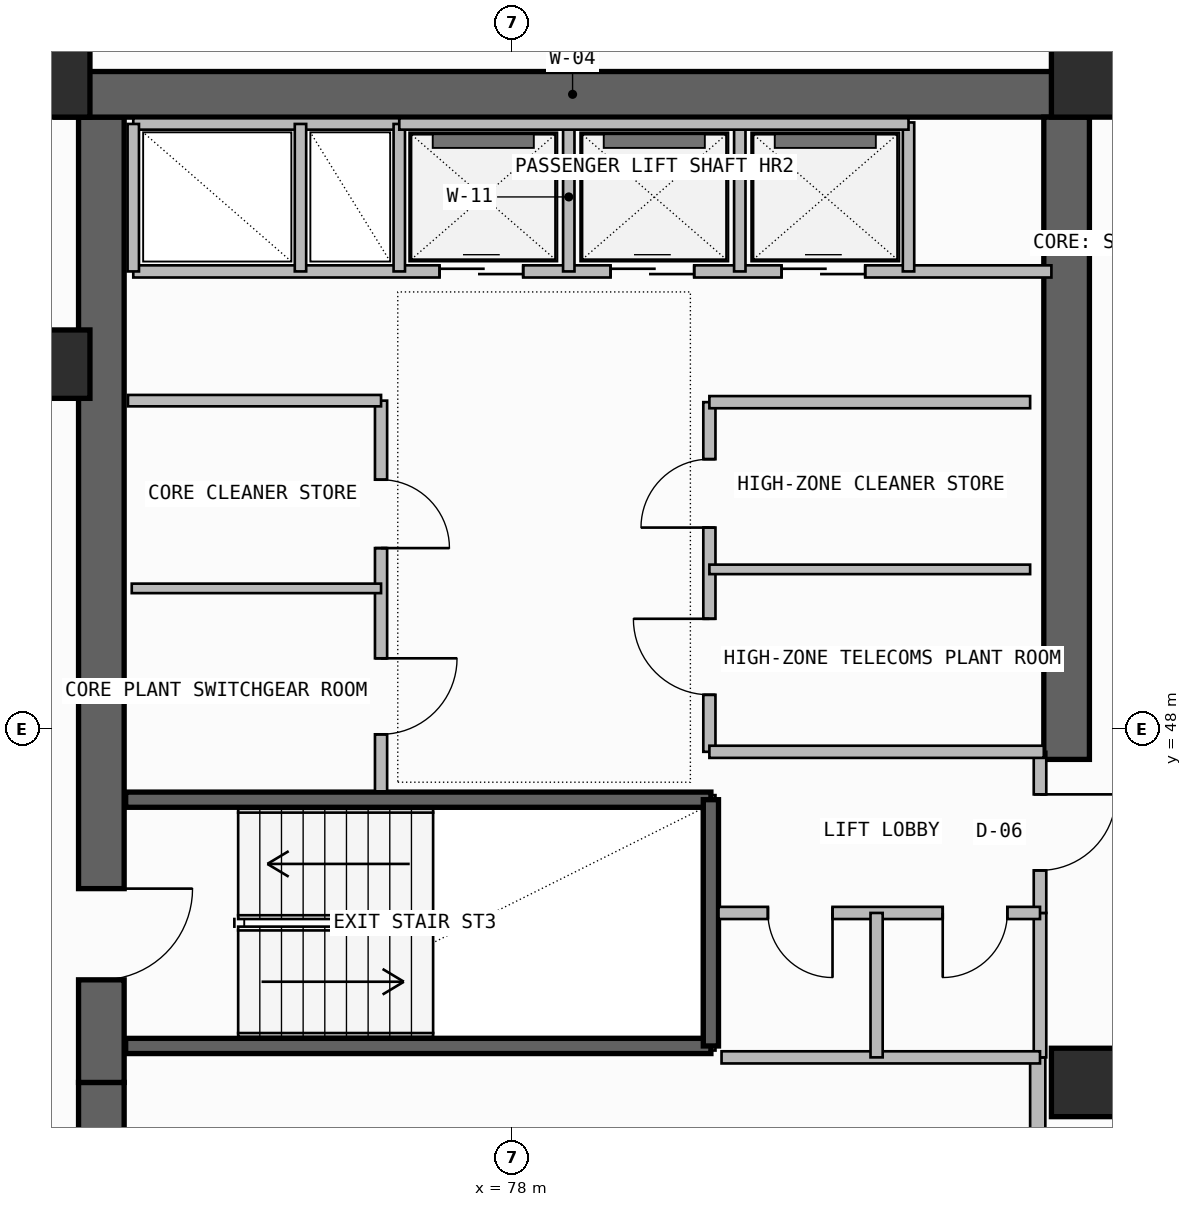
"""IFC4 building model, lengths in metres.
Left out: names, types, materials, properties, quantities, classifications, styles, units other than length and angle.
Written with IfcOpenShell. Run it as: python <this file> out.ifc"""

import sys

from ifc_helpers import new_model, si_unit, direction, frame, frame_2d, origin, origin_2d, place, context, subcontext, project, spatial, rectangle, extrude, element, fill, save


model = new_model("IFC4")
c1 = context("Model", 3, precision=1e-05, world=origin(), true_north=direction((0.0, 1.0)))
c2 = subcontext(c1, "Body", "Model", "MODEL_VIEW")
j1 = project(units=[si_unit("LENGTHUNIT", "METRE"), si_unit("PLANEANGLEUNIT", "RADIAN")], contexts=[c1])
p1 = place(None, origin())
s1 = spatial("IfcSite", under=j1, at=p1, CompositionType="ELEMENT")
p2 = place(p1, origin())
s2 = spatial("IfcBuilding", under=s1, at=p2, CompositionType="ELEMENT")
p3 = place(p2, frame((0.0, 0.0, 260.74)))
s3 = spatial("IfcBuildingStorey", under=s2, at=p3, CompositionType="ELEMENT", Elevation=260.74)
p4 = place(p3, frame((72.6, 35.5, -0.26), z_axis=(0.0, 0.0, 1.0), x_axis=(0.0, 1.0, 0.0)))
e1 = element("IfcWall", 1, at=p4, inside=s3, PredefinedType="SHEAR", context=c2, shape_type="SweptSolid", body=[
    extrude(rectangle(XDim=7.85, YDim=0.6, at=frame_2d((3.925, 0.0))), origin(), (0.0, 0.0, 1.0), 3.52),
])
p5 = place(p4, frame((1.45, 0.0, 0.26)))
e2 = element("IfcOpeningElement", 2, at=p5, cuts=e1, PredefinedType="OPENING", context=c2, shape_type="SweptSolid", body=[
    extrude(rectangle(XDim=1.2, YDim=2.2, at=frame_2d((0.6, 1.1))), frame((0.0, 0.31, 0.0), z_axis=(0.0, -1.0, 0.0), x_axis=(1.0, 0.0, 0.0)), (0.0, 0.0, 1.0), 0.62),
])
p6 = place(p3, frame((72.6, 43.35, -0.26), z_axis=(0.0, 0.0, 1.0), x_axis=(0.0, 1.0, 0.0)))
e3 = element("IfcWall", 3, at=p6, inside=s3, PredefinedType="SHEAR", context=c2, shape_type="SweptSolid", body=[
    extrude(rectangle(XDim=12.7, YDim=0.6, at=frame_2d((6.35, 0.0))), origin(), (0.0, 0.0, 1.0), 3.52),
])
p7 = place(p6, frame((1.35, 0.0, 0.26)))
e4 = element("IfcOpeningElement", 4, at=p7, cuts=e3, PredefinedType="OPENING", context=c2, shape_type="SweptSolid", body=[
    extrude(rectangle(XDim=1.2, YDim=2.2, at=frame_2d((0.6, 1.1))), frame((0.0, 0.31, 0.0), z_axis=(0.0, -1.0, 0.0), x_axis=(1.0, 0.0, 0.0)), (0.0, 0.0, 1.0), 0.62),
])
p8 = place(p3, frame((72.0, 56.35, -0.26), z_axis=(0.0, 0.0, 1.0), x_axis=(1.0, 0.0, 0.0)))
e5 = element("IfcWall", 5, at=p8, inside=s3, PredefinedType="SHEAR", context=c2, shape_type="SweptSolid", body=[
    extrude(rectangle(XDim=13.6, YDim=0.6, at=frame_2d((6.8, 0.0))), origin(), (0.0, 0.0, 1.0), 3.52),
])
p9 = place(p3, frame((85.3, 47.6, -0.26), z_axis=(0.0, 0.0, 1.0), x_axis=(0.0, 1.0, 0.0)))
e6 = element("IfcWall", 6, at=p9, inside=s3, PredefinedType="SHEAR", context=c2, shape_type="SweptSolid", body=[
    extrude(rectangle(XDim=8.45, YDim=0.6, at=frame_2d((4.225, 0.0))), origin(), (0.0, 0.0, 1.0), 3.52),
])
for number, where, z_axis, x_axis in (
    (7, (85.55, 43.35, 0.0), (0.0, 0.0, 1.0), (1.0, 0.0, 0.0)),
    (8, (72.0, 52.8, 0.0), (0.0, 0.0, 1.0), (1.0, 0.0, 0.0)),
    (9, (72.0, 56.5, 0.0), (0.0, 0.0, 1.0), (1.0, 0.0, 0.0)),
    (10, (85.55, 56.5, 0.0), (0.0, 0.0, 1.0), (1.0, 0.0, 0.0)),
):
    element("IfcColumn", number, at=place(p3, frame(where, z_axis=z_axis, x_axis=x_axis)), inside=s3, PredefinedType="COLUMN", context=c2, shape_type="SweptSolid", body=[
        extrude(rectangle(XDim=0.9, YDim=0.9, at=origin_2d()), origin(), (0.0, 0.0, 1.0), 3.52),
    ])
p10 = place(p3, frame((84.92, 38.85, 0.0), z_axis=(0.0, 0.0, 1.0), x_axis=(0.0, 1.0, 0.0)))
e11 = element("IfcWall", 11, at=p10, inside=s3, PredefinedType="SOLIDWALL", context=c2, shape_type="SweptSolid", body=[
    extrude(rectangle(XDim=4.83, YDim=0.2, at=frame_2d((2.415, 0.0))), origin(), (0.0, 0.0, 1.0), 3.26),
])
p11 = place(p10, frame((1.25, 0.0, 0.0)))
e12 = element("IfcOpeningElement", 12, at=p11, cuts=e11, PredefinedType="OPENING", context=c2, shape_type="SweptSolid", body=[
    extrude(rectangle(XDim=1.1, YDim=2.2, at=frame_2d((0.55, 1.1))), frame((0.0, 0.11, 0.0), z_axis=(0.0, -1.0, 0.0), x_axis=(1.0, 0.0, 0.0)), (0.0, 0.0, 1.0), 0.22),
])
for number, where, z_axis, x_axis in (
    (13, (72.92, 43.83, -0.26), (0.0, 0.0, 1.0), (1.0, 0.0, 0.0)),
    (14, (72.92, 47.07, -0.26), (0.0, 0.0, 1.0), (1.0, 0.0, 0.0)),
):
    element("IfcWall", number, at=place(p3, frame(where, z_axis=z_axis, x_axis=x_axis)), inside=s3, PredefinedType="SOLIDWALL", context=c2, shape_type="SweptSolid", body=[
        extrude(rectangle(XDim=7.7, YDim=0.2, at=frame_2d((3.85, 0.0))), origin(), (0.0, 0.0, 1.0), 3.52),
    ])
p12 = place(p3, frame((80.62, 43.83, -0.26), z_axis=(0.0, 0.0, 1.0), x_axis=(0.0, 1.0, 0.0)))
e15 = element("IfcWall", 15, at=p12, inside=s3, PredefinedType="SOLIDWALL", context=c2, shape_type="SweptSolid", body=[
    extrude(rectangle(XDim=3.24, YDim=0.2, at=frame_2d((1.62, 0.0))), origin(), (0.0, 0.0, 1.0), 3.52),
])
p13 = place(p3, frame((84.95, 43.68, 0.0), z_axis=(0.0, 0.0, 1.0), x_axis=(0.0, 1.0, 0.0)))
e16 = element("IfcWall", 16, at=p13, inside=s3, PredefinedType="PLUMBINGWALL", context=c2, shape_type="SweptSolid", body=[
    extrude(rectangle(XDim=1.9, YDim=0.165, at=frame_2d((0.95, 0.0))), origin(), (0.0, 0.0, 1.0), 3.26),
])
p14 = place(p3, frame((84.95, 45.58, 0.0), z_axis=(0.0, 0.0, 1.0), x_axis=(0.0, 1.0, 0.0)))
e17 = element("IfcWall", 17, at=p14, inside=s3, PredefinedType="PARTITIONING", context=c2, shape_type="SweptSolid", body=[
    extrude(rectangle(XDim=2.12, YDim=0.165, at=frame_2d((1.06, 0.0))), origin(), (0.0, 0.0, 1.0), 3.26),
])
p15 = place(p14, frame((0.56, 0.0, 0.0)))
e18 = element("IfcOpeningElement", 18, at=p15, cuts=e17, PredefinedType="OPENING", context=c2, shape_type="SweptSolid", body=[
    extrude(rectangle(XDim=1.0, YDim=2.2, at=frame_2d((0.5, 1.1))), frame((0.0, 0.093, 0.0), z_axis=(0.0, -1.0, 0.0), x_axis=(1.0, 0.0, 0.0)), (0.0, 0.0, 1.0), 0.185),
])
p16 = place(p3, frame((80.72, 45.58, 0.0), z_axis=(0.0, 0.0, 1.0), x_axis=(1.0, 0.0, 0.0)))
e19 = element("IfcWall", 19, at=p16, inside=s3, PredefinedType="PLUMBINGWALL", context=c2, shape_type="SweptSolid", body=[
    extrude(rectangle(XDim=4.23, YDim=0.16, at=frame_2d((2.115, 0.0))), origin(), (0.0, 0.0, 1.0), 3.26),
])
p17 = place(p16, frame((0.65, 0.0, 0.0)))
e20 = element("IfcOpeningElement", 20, at=p17, cuts=e19, PredefinedType="OPENING", context=c2, shape_type="SweptSolid", body=[
    extrude(rectangle(XDim=0.85, YDim=2.05, at=frame_2d((0.425, 1.025))), frame((0.0, 0.09, 0.0), z_axis=(0.0, -1.0, 0.0), x_axis=(1.0, 0.0, 0.0)), (0.0, 0.0, 1.0), 0.18),
])
p18 = place(p16, frame((2.95, 0.0, 0.0)))
e21 = element("IfcOpeningElement", 21, at=p18, cuts=e19, PredefinedType="OPENING", context=c2, shape_type="SweptSolid", body=[
    extrude(rectangle(XDim=0.85, YDim=2.05, at=frame_2d((0.425, 1.025))), frame((0.0, 0.09, 0.0), z_axis=(0.0, -1.0, 0.0), x_axis=(1.0, 0.0, 0.0)), (0.0, 0.0, 1.0), 0.18),
])
p19 = place(p3, frame((80.76, 43.68, 0.0), z_axis=(0.0, 0.0, 1.0), x_axis=(1.0, 0.0, 0.0)))
e22 = element("IfcWall", 22, at=p19, inside=s3, PredefinedType="PLUMBINGWALL", context=c2, shape_type="SweptSolid", body=[
    extrude(rectangle(XDim=4.19, YDim=0.16, at=frame_2d((2.095, 0.0))), origin(), (0.0, 0.0, 1.0), 3.26),
])
p20 = place(p3, frame((82.8, 43.68, 0.0), z_axis=(0.0, 0.0, 1.0), x_axis=(0.0, 1.0, 0.0)))
e23 = element("IfcWall", 23, at=p20, inside=s3, PredefinedType="PLUMBINGWALL", context=c2, shape_type="SweptSolid", body=[
    extrude(rectangle(XDim=1.9, YDim=0.16, at=frame_2d((0.95, 0.0))), origin(), (0.0, 0.0, 1.0), 3.26),
])
p21 = place(p3, frame((76.28, 47.18, 0.0), z_axis=(0.0, 0.0, 1.0), x_axis=(0.0, 1.0, 0.0)))
e24 = element("IfcWall", 24, at=p21, inside=s3, PredefinedType="SOLIDWALL", context=c2, shape_type="SweptSolid", body=[
    extrude(rectangle(XDim=5.14, YDim=0.16, at=frame_2d((2.57, 0.0))), origin(), (0.0, 0.0, 1.0), 3.26),
])
p22 = place(p21, frame((0.75, 0.0, 0.0)))
e25 = element("IfcOpeningElement", 25, at=p22, cuts=e24, PredefinedType="OPENING", context=c2, shape_type="SweptSolid", body=[
    extrude(rectangle(XDim=1.0, YDim=2.2, at=frame_2d((0.5, 1.1))), frame((0.0, 0.09, 0.0), z_axis=(0.0, -1.0, 0.0), x_axis=(1.0, 0.0, 0.0)), (0.0, 0.0, 1.0), 0.18),
])
p23 = place(p21, frame((3.2, 0.0, 0.0)))
e26 = element("IfcOpeningElement", 26, at=p23, cuts=e24, PredefinedType="OPENING", context=c2, shape_type="SweptSolid", body=[
    extrude(rectangle(XDim=0.9, YDim=2.1, at=frame_2d((0.45, 1.05))), frame((0.0, 0.09, 0.0), z_axis=(0.0, -1.0, 0.0), x_axis=(1.0, 0.0, 0.0)), (0.0, 0.0, 1.0), 0.18),
])
p24 = place(p3, frame((72.95, 52.32, 0.0), z_axis=(0.0, 0.0, 1.0), x_axis=(1.0, 0.0, 0.0)))
e27 = element("IfcWall", 27, at=p24, inside=s3, PredefinedType="SOLIDWALL", context=c2, shape_type="SweptSolid", body=[
    extrude(rectangle(XDim=3.33, YDim=0.15, at=frame_2d((1.665, 0.0))), origin(), (0.0, 0.0, 1.0), 3.26),
])
p25 = place(p3, frame((73.0, 49.85, 0.0), z_axis=(0.0, 0.0, 1.0), x_axis=(1.0, 0.0, 0.0)))
e28 = element("IfcWall", 28, at=p25, inside=s3, PredefinedType="PARTITIONING", context=c2, shape_type="SweptSolid", body=[
    extrude(rectangle(XDim=3.28, YDim=0.125, at=frame_2d((1.64, 0.0))), origin(), (0.0, 0.0, 1.0), 3.26),
])
p26 = place(p3, frame((80.6, 47.7, 0.0), z_axis=(0.0, 0.0, 1.0), x_axis=(0.0, 1.0, 0.0)))
e29 = element("IfcWall", 29, at=p26, inside=s3, PredefinedType="SOLIDWALL", context=c2, shape_type="SweptSolid", body=[
    extrude(rectangle(XDim=4.6, YDim=0.16, at=frame_2d((2.3, 0.0))), origin(), (0.0, 0.0, 1.0), 3.26),
])
p27 = place(p26, frame((0.75, 0.0, 0.0)))
e30 = element("IfcOpeningElement", 30, at=p27, cuts=e29, PredefinedType="OPENING", context=c2, shape_type="SweptSolid", body=[
    extrude(rectangle(XDim=1.0, YDim=2.2, at=frame_2d((0.5, 1.1))), frame((0.0, 0.09, 0.0), z_axis=(0.0, -1.0, 0.0), x_axis=(1.0, 0.0, 0.0)), (0.0, 0.0, 1.0), 0.18),
])
p28 = place(p26, frame((2.95, 0.0, 0.0)))
e31 = element("IfcOpeningElement", 31, at=p28, cuts=e29, PredefinedType="OPENING", context=c2, shape_type="SweptSolid", body=[
    extrude(rectangle(XDim=0.9, YDim=2.1, at=frame_2d((0.45, 1.05))), frame((0.0, 0.09, 0.0), z_axis=(0.0, -1.0, 0.0), x_axis=(1.0, 0.0, 0.0)), (0.0, 0.0, 1.0), 0.18),
])
p29 = place(p3, frame((80.6, 47.7, 0.0), z_axis=(0.0, 0.0, 1.0), x_axis=(1.0, 0.0, 0.0)))
e32 = element("IfcWall", 32, at=p29, inside=s3, PredefinedType="SOLIDWALL", context=c2, shape_type="SweptSolid", body=[
    extrude(rectangle(XDim=4.4, YDim=0.16, at=frame_2d((2.2, 0.0))), origin(), (0.0, 0.0, 1.0), 3.26),
])
p30 = place(p3, frame((80.6, 52.3, 0.0), z_axis=(0.0, 0.0, 1.0), x_axis=(1.0, 0.0, 0.0)))
e33 = element("IfcWall", 33, at=p30, inside=s3, PredefinedType="SOLIDWALL", context=c2, shape_type="SweptSolid", body=[
    extrude(rectangle(XDim=4.22, YDim=0.16, at=frame_2d((2.11, 0.0))), origin(), (0.0, 0.0, 1.0), 3.26),
])
p31 = place(p3, frame((80.6, 50.1, 0.0), z_axis=(0.0, 0.0, 1.0), x_axis=(1.0, 0.0, 0.0)))
e34 = element("IfcWall", 34, at=p31, inside=s3, PredefinedType="PARTITIONING", context=c2, shape_type="SweptSolid", body=[
    extrude(rectangle(XDim=4.22, YDim=0.125, at=frame_2d((2.11, 0.0))), origin(), (0.0, 0.0, 1.0), 3.26),
])
p32 = place(p3, frame((73.02, 54.02, 0.0), z_axis=(0.0, 0.0, 1.0), x_axis=(1.0, 0.0, 0.0)))
e35 = element("IfcWall", 35, at=p32, inside=s3, PredefinedType="SOLIDWALL", context=c2, shape_type="SweptSolid", body=[
    extrude(rectangle(XDim=12.08, YDim=0.16, at=frame_2d((6.04, 0.0))), origin(), (0.0, 0.0, 1.0), 3.26),
])
p33 = place(p32, frame((4.03, 0.0, 0.0)))
e36 = element("IfcOpeningElement", 36, at=p33, cuts=e35, PredefinedType="OPENING", context=c2, shape_type="SweptSolid", body=[
    extrude(rectangle(XDim=1.1, YDim=2.25, at=frame_2d((0.55, 1.125))), frame((0.0, 0.09, 0.0), z_axis=(0.0, -1.0, 0.0), x_axis=(1.0, 0.0, 0.0)), (0.0, 0.0, 1.0), 0.18),
])
p34 = place(p32, frame((6.28, 0.0, 0.0)))
e37 = element("IfcOpeningElement", 37, at=p34, cuts=e35, PredefinedType="OPENING", context=c2, shape_type="SweptSolid", body=[
    extrude(rectangle(XDim=1.1, YDim=2.25, at=frame_2d((0.55, 1.125))), frame((0.0, 0.09, 0.0), z_axis=(0.0, -1.0, 0.0), x_axis=(1.0, 0.0, 0.0)), (0.0, 0.0, 1.0), 0.18),
])
p35 = place(p32, frame((8.53, 0.0, 0.0)))
e38 = element("IfcOpeningElement", 38, at=p35, cuts=e35, PredefinedType="OPENING", context=c2, shape_type="SweptSolid", body=[
    extrude(rectangle(XDim=1.1, YDim=2.25, at=frame_2d((0.55, 1.125))), frame((0.0, 0.09, 0.0), z_axis=(0.0, -1.0, 0.0), x_axis=(1.0, 0.0, 0.0)), (0.0, 0.0, 1.0), 0.18),
])
p36 = place(p3, frame((73.02, 55.96, 0.0), z_axis=(0.0, 0.0, 1.0), x_axis=(1.0, 0.0, 0.0)))
e39 = element("IfcWall", 39, at=p36, inside=s3, PredefinedType="SOLIDWALL", context=c2, shape_type="SweptSolid", body=[
    extrude(rectangle(XDim=3.5, YDim=0.15, at=frame_2d((1.75, 0.0))), origin(), (0.0, 0.0, 1.0), 3.26),
])
p37 = place(p3, frame((73.02, 54.02, 0.0), z_axis=(0.0, 0.0, 1.0), x_axis=(0.0, 1.0, 0.0)))
e40 = element("IfcWall", 40, at=p37, inside=s3, PredefinedType="PLUMBINGWALL", context=c2, shape_type="SweptSolid", body=[
    extrude(rectangle(XDim=1.94, YDim=0.15, at=frame_2d((0.97, 0.0))), origin(), (0.0, 0.0, 1.0), 3.26),
])
p38 = place(p3, frame((76.52, 54.02, 0.0), z_axis=(0.0, 0.0, 1.0), x_axis=(0.0, 1.0, 0.0)))
e41 = element("IfcWall", 41, at=p38, inside=s3, PredefinedType="SOLIDWALL", context=c2, shape_type="SweptSolid", body=[
    extrude(rectangle(XDim=1.94, YDim=0.15, at=frame_2d((0.97, 0.0))), origin(), (0.0, 0.0, 1.0), 3.26),
])
p39 = place(p3, frame((75.22, 54.02, 0.0), z_axis=(0.0, 0.0, 1.0), x_axis=(0.0, 1.0, 0.0)))
e42 = element("IfcWall", 42, at=p39, inside=s3, PredefinedType="PLUMBINGWALL", context=c2, shape_type="SweptSolid", body=[
    extrude(rectangle(XDim=1.94, YDim=0.15, at=frame_2d((0.97, 0.0))), origin(), (0.0, 0.0, 1.0), 3.26),
])
for number, where, z_axis, x_axis in (
    (43, (78.75, 54.02, 0.0), (0.0, 0.0, 1.0), (0.0, 1.0, 0.0)),
    (44, (81.0, 54.02, 0.0), (0.0, 0.0, 1.0), (0.0, 1.0, 0.0)),
):
    element("IfcWall", number, at=place(p3, frame(where, z_axis=z_axis, x_axis=x_axis)), inside=s3, PredefinedType="PLUMBINGWALL", context=c2, shape_type="SweptSolid", body=[
        extrude(rectangle(XDim=1.96, YDim=0.15, at=frame_2d((0.98, 0.0))), origin(), (0.0, 0.0, 1.0), 3.26),
    ])
p40 = place(p3, frame((83.22, 54.02, 0.0), z_axis=(0.0, 0.0, 1.0), x_axis=(0.0, 1.0, 0.0)))
e45 = element("IfcWall", 45, at=p40, inside=s3, PredefinedType="SOLIDWALL", context=c2, shape_type="SweptSolid", body=[
    extrude(rectangle(XDim=1.96, YDim=0.15, at=frame_2d((0.98, 0.0))), origin(), (0.0, 0.0, 1.0), 3.26),
])
p41 = place(p3, frame((76.52, 55.96, 0.0), z_axis=(0.0, 0.0, 1.0), x_axis=(1.0, 0.0, 0.0)))
e46 = element("IfcWall", 46, at=p41, inside=s3, PredefinedType="SOLIDWALL", context=c2, shape_type="SweptSolid", body=[
    extrude(rectangle(XDim=6.7, YDim=0.15, at=frame_2d((3.35, 0.0))), origin(), (0.0, 0.0, 1.0), 3.26),
])
p42 = place(p7, frame((1.2, 0.0, 0.0), z_axis=(0.0, 0.0, 1.0), x_axis=(-1.0, 0.0, 0.0)))
e47 = element("IfcDoor", 47, at=p42, inside=s3, OperationType="SINGLE_SWING_LEFT", PredefinedType="USERDEFINED", context=c2, shape_type="SweptSolid", body=[
    extrude(rectangle(XDim=1.2, YDim=2.2, at=frame_2d((0.6, 1.1))), frame((0.0, 0.025, 0.0), z_axis=(0.0, -1.0, 0.0), x_axis=(1.0, 0.0, 0.0)), (0.0, 0.0, 1.0), 0.05),
])
fill(e4, e47)
p43 = place(p15, frame((1.0, 0.0, 0.0), z_axis=(0.0, 0.0, 1.0), x_axis=(-1.0, 0.0, 0.0)))
e48 = element("IfcDoor", 48, at=p43, inside=s3, OperationType="SINGLE_SWING_LEFT", PredefinedType="DOOR", context=c2, shape_type="SweptSolid", body=[
    extrude(rectangle(XDim=1.0, YDim=2.2, at=frame_2d((0.5, 1.1))), frame((0.0, 0.025, 0.0), z_axis=(0.0, -1.0, 0.0), x_axis=(1.0, 0.0, 0.0)), (0.0, 0.0, 1.0), 0.05),
])
fill(e18, e48)
p44 = place(p17, frame((0.85, 0.0, 0.0), z_axis=(0.0, 0.0, 1.0), x_axis=(-1.0, 0.0, 0.0)))
e49 = element("IfcDoor", 49, at=p44, inside=s3, OperationType="SINGLE_SWING_LEFT", PredefinedType="DOOR", context=c2, shape_type="SweptSolid", body=[
    extrude(rectangle(XDim=0.85, YDim=2.05, at=frame_2d((0.425, 1.025))), frame((0.0, 0.025, 0.0), z_axis=(0.0, -1.0, 0.0), x_axis=(1.0, 0.0, 0.0)), (0.0, 0.0, 1.0), 0.05),
])
fill(e20, e49)
p45 = place(p18, frame((0.85, 0.0, 0.0), z_axis=(0.0, 0.0, 1.0), x_axis=(-1.0, 0.0, 0.0)))
e50 = element("IfcDoor", 50, at=p45, inside=s3, OperationType="SINGLE_SWING_RIGHT", PredefinedType="DOOR", context=c2, shape_type="SweptSolid", body=[
    extrude(rectangle(XDim=0.85, YDim=2.05, at=frame_2d((0.425, 1.025))), frame((0.0, 0.025, 0.0), z_axis=(0.0, -1.0, 0.0), x_axis=(1.0, 0.0, 0.0)), (0.0, 0.0, 1.0), 0.05),
])
fill(e21, e50)
p46 = place(p22, frame((1.0, 0.0, 0.0), z_axis=(0.0, 0.0, 1.0), x_axis=(-1.0, 0.0, 0.0)))
e51 = element("IfcDoor", 51, at=p46, inside=s3, OperationType="SINGLE_SWING_LEFT", PredefinedType="DOOR", context=c2, shape_type="SweptSolid", body=[
    extrude(rectangle(XDim=1.0, YDim=2.2, at=frame_2d((0.5, 1.1))), frame((0.0, 0.025, 0.0), z_axis=(0.0, -1.0, 0.0), x_axis=(1.0, 0.0, 0.0)), (0.0, 0.0, 1.0), 0.05),
])
fill(e25, e51)
p47 = place(p23, frame((0.9, 0.0, 0.0), z_axis=(0.0, 0.0, 1.0), x_axis=(-1.0, 0.0, 0.0)))
e52 = element("IfcDoor", 52, at=p47, inside=s3, OperationType="SINGLE_SWING_RIGHT", PredefinedType="DOOR", context=c2, shape_type="SweptSolid", body=[
    extrude(rectangle(XDim=0.9, YDim=2.1, at=frame_2d((0.45, 1.05))), frame((0.0, 0.025, 0.0), z_axis=(0.0, -1.0, 0.0), x_axis=(1.0, 0.0, 0.0)), (0.0, 0.0, 1.0), 0.05),
])
fill(e26, e52)
p48 = place(p27, origin())
e53 = element("IfcDoor", 53, at=p48, inside=s3, OperationType="SINGLE_SWING_RIGHT", PredefinedType="DOOR", context=c2, shape_type="SweptSolid", body=[
    extrude(rectangle(XDim=1.0, YDim=2.2, at=frame_2d((0.5, 1.1))), frame((0.0, 0.025, 0.0), z_axis=(0.0, -1.0, 0.0), x_axis=(1.0, 0.0, 0.0)), (0.0, 0.0, 1.0), 0.05),
])
fill(e30, e53)
p49 = place(p28, origin())
e54 = element("IfcDoor", 54, at=p49, inside=s3, OperationType="SINGLE_SWING_LEFT", PredefinedType="DOOR", context=c2, shape_type="SweptSolid", body=[
    extrude(rectangle(XDim=0.9, YDim=2.1, at=frame_2d((0.45, 1.05))), frame((0.0, 0.025, 0.0), z_axis=(0.0, -1.0, 0.0), x_axis=(1.0, 0.0, 0.0)), (0.0, 0.0, 1.0), 0.05),
])
fill(e31, e54)
p50 = place(p33, origin())
e55 = element("IfcDoor", 55, at=p50, inside=s3, OperationType="DOUBLE_DOOR_SLIDING", PredefinedType="DOOR", context=c2, shape_type="SweptSolid", body=[
    extrude(rectangle(XDim=1.1, YDim=2.25, at=frame_2d((0.55, 1.125))), frame((0.0, 0.025, 0.0), z_axis=(0.0, -1.0, 0.0), x_axis=(1.0, 0.0, 0.0)), (0.0, 0.0, 1.0), 0.05),
])
fill(e36, e55)
p51 = place(p34, origin())
e56 = element("IfcDoor", 56, at=p51, inside=s3, OperationType="DOUBLE_DOOR_SLIDING", PredefinedType="DOOR", context=c2, shape_type="SweptSolid", body=[
    extrude(rectangle(XDim=1.1, YDim=2.25, at=frame_2d((0.55, 1.125))), frame((0.0, 0.025, 0.0), z_axis=(0.0, -1.0, 0.0), x_axis=(1.0, 0.0, 0.0)), (0.0, 0.0, 1.0), 0.05),
])
fill(e37, e56)
p52 = place(p35, origin())
e57 = element("IfcDoor", 57, at=p52, inside=s3, OperationType="DOUBLE_DOOR_SLIDING", PredefinedType="DOOR", context=c2, shape_type="SweptSolid", body=[
    extrude(rectangle(XDim=1.1, YDim=2.25, at=frame_2d((0.55, 1.125))), frame((0.0, 0.025, 0.0), z_axis=(0.0, -1.0, 0.0), x_axis=(1.0, 0.0, 0.0)), (0.0, 0.0, 1.0), 0.05),
])
fill(e38, e57)
save(model, sys.argv[1])
